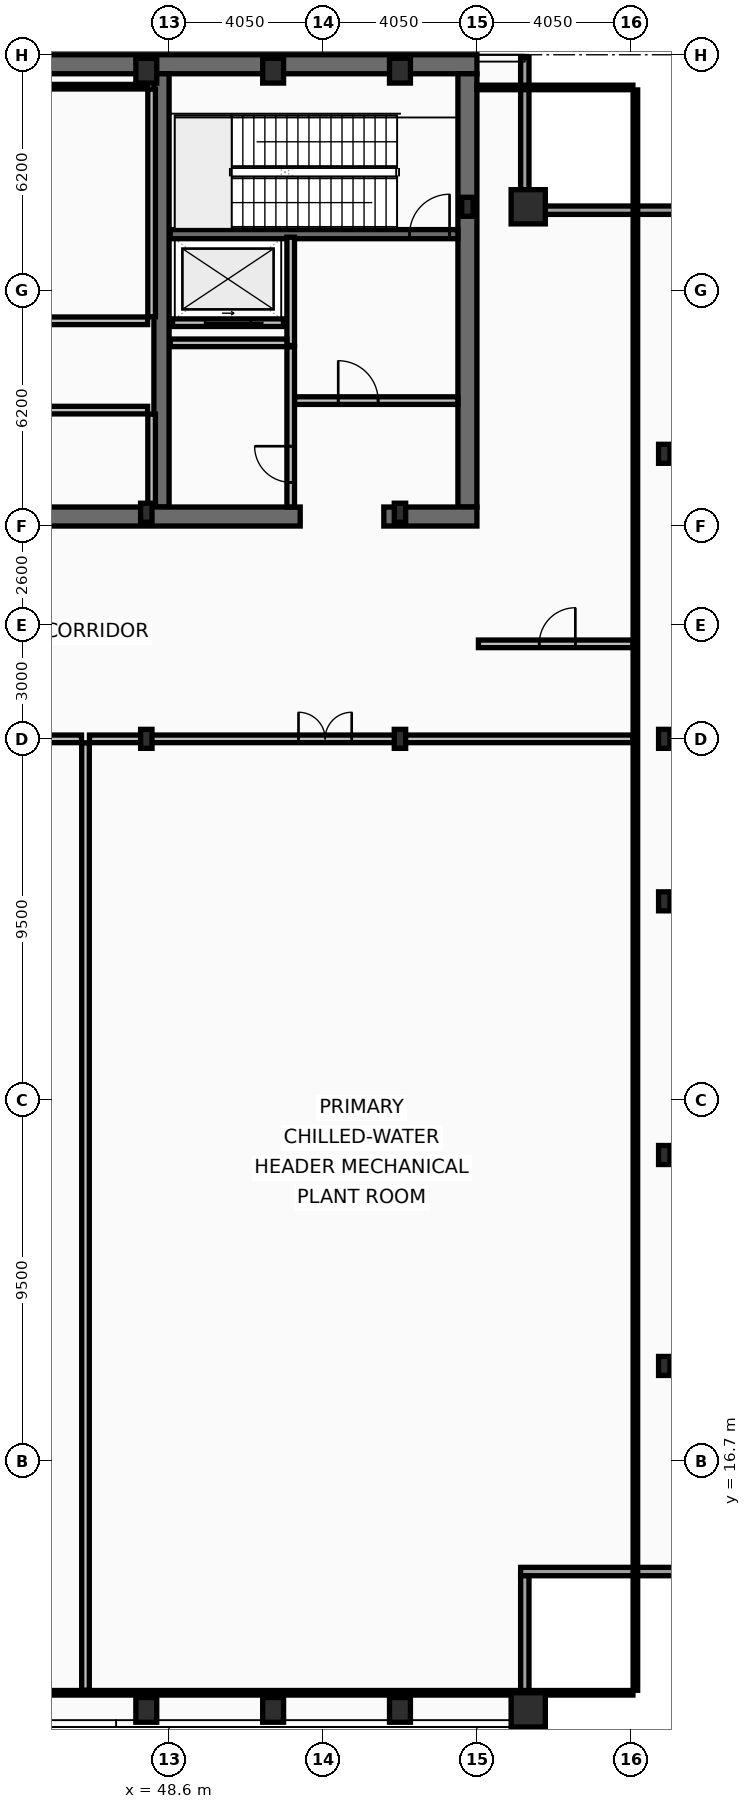
"""IFC4 building model, lengths in metres.
Left out: names, types, materials, properties, quantities, classifications, styles, units other than length and angle.
Written with IfcOpenShell. Run it as: python <this file> out.ifc"""

import sys

from ifc_helpers import new_model, si_unit, direction, frame, frame_2d, origin, origin_2d, place, context, subcontext, project, spatial, rectangle, hollow_rectangle, i_section, extrude, element, fill, save


model = new_model("IFC4")
c1 = context("Model", 3, precision=1e-05, world=origin(), true_north=direction((0.0, 1.0)))
c2 = subcontext(c1, "Body", "Model", "MODEL_VIEW")
j1 = project(units=[si_unit("LENGTHUNIT", "METRE"), si_unit("PLANEANGLEUNIT", "RADIAN")], contexts=[c1])
p1 = place(None, origin())
s1 = spatial("IfcSite", under=j1, at=p1, CompositionType="ELEMENT")
p2 = place(p1, origin())
s2 = spatial("IfcBuilding", under=s1, at=p2, CompositionType="ELEMENT")
p3 = place(p2, frame((0.0, 0.0, 361.8)))
s3 = spatial("IfcBuildingStorey", under=s2, at=p3, CompositionType="ELEMENT", Elevation=361.8)
p4 = place(p3, frame((16.2, 53.45, 0.0), z_axis=(0.0, 0.0, 1.0), x_axis=(1.0, 0.0, 0.0)))
e1 = element("IfcWall", 1, at=p4, inside=s3, PredefinedType="SHEAR", context=c2, shape_type="SweptSolid", body=[
    extrude(rectangle(XDim=40.5, YDim=0.5, at=frame_2d((20.25, 0.0))), origin(), (0.0, 0.0, 1.0), 5.4),
])
p5 = place(p3, frame((56.45, 53.2, 0.0), z_axis=(0.0, 0.0, 1.0), x_axis=(0.0, -1.0, 0.0)))
e2 = element("IfcWall", 2, at=p5, inside=s3, PredefinedType="SHEAR", context=c2, shape_type="SweptSolid", body=[
    extrude(rectangle(XDim=11.4, YDim=0.5, at=frame_2d((5.7, 0.0))), origin(), (0.0, 0.0, 1.0), 5.4),
])
p6 = place(p3, frame((48.4, 41.8, 0.0), z_axis=(0.0, 0.0, 1.0), x_axis=(0.0, 1.0, 0.0)))
e3 = element("IfcWall", 3, at=p6, inside=s3, PredefinedType="SHEAR", context=c2, shape_type="SweptSolid", body=[
    extrude(rectangle(XDim=11.4, YDim=0.4, at=frame_2d((5.7, 0.0))), origin(), (0.0, 0.0, 1.0), 5.4),
])
p7 = place(p3, frame((52.05, 41.55, 0.0), z_axis=(0.0, 0.0, 1.0), x_axis=(-1.0, 0.0, 0.0)))
e4 = element("IfcWall", 4, at=p7, inside=s3, PredefinedType="SHEAR", context=c2, shape_type="SweptSolid", body=[
    extrude(rectangle(XDim=11.3, YDim=0.5, at=frame_2d((5.65, 0.0))), origin(), (0.0, 0.0, 1.0), 5.4),
])
p8 = place(p3, frame((56.7, 41.55, 0.0), z_axis=(0.0, 0.0, 1.0), x_axis=(-1.0, 0.0, 0.0)))
e5 = element("IfcWall", 5, at=p8, inside=s3, PredefinedType="SHEAR", context=c2, shape_type="SweptSolid", body=[
    extrude(rectangle(XDim=2.45, YDim=0.5, at=frame_2d((1.225, 0.0))), origin(), (0.0, 0.0, 1.0), 5.4),
])
p9 = place(p3, frame((48.63, 48.98, 0.0), z_axis=(0.0, 0.0, 1.0), x_axis=(1.0, 0.0, 0.0)))
e6 = element("IfcWall", 6, at=p9, inside=s3, PredefinedType="SHEAR", context=c2, shape_type="SweptSolid", body=[
    extrude(rectangle(XDim=7.57, YDim=0.24, at=frame_2d((3.785, 0.0))), origin(), (0.0, 0.0, 1.0), 5.4),
])
p10 = place(p9, frame((6.3, 0.0, 0.0)))
e7 = element("IfcOpeningElement", 7, at=p10, cuts=e6, PredefinedType="OPENING", context=c2, shape_type="SweptSolid", body=[
    extrude(rectangle(XDim=1.05, YDim=2.15, at=frame_2d((0.525, 1.075))), frame((0.0, 0.13, 0.0), z_axis=(0.0, -1.0, 0.0), x_axis=(1.0, 0.0, 0.0)), (0.0, 0.0, 1.0), 0.26),
])
for number, where, z_axis, x_axis in (
    (8, (58.05, 10.15, 0.0), (0.0, 0.0, 1.0), (1.0, 0.0, 0.0)),
    (9, (58.05, 49.7, 0.0), (0.0, 0.0, 1.0), (1.0, 0.0, 0.0)),
):
    element("IfcColumn", number, at=place(p3, frame(where, z_axis=z_axis, x_axis=x_axis)), inside=s3, PredefinedType="COLUMN", context=c2, shape_type="SweptSolid", body=[
        extrude(hollow_rectangle(XDim=0.9, YDim=0.9, WallThickness=0.05, at=origin_2d()), origin(), (0.0, 0.0, 1.0), 5.6),
    ])
for number, where, z_axis, x_axis in (
    (10, (48.0, 10.15, 0.0), (0.0, 0.0, 1.0), (1.0, 0.0, 0.0)),
    (11, (51.337, 10.15, 0.0), (0.0, 0.0, 1.0), (1.0, 0.0, 0.0)),
    (12, (54.675, 10.15, 0.0), (0.0, 0.0, 1.0), (1.0, 0.0, 0.0)),
    (13, (48.0, 53.28, 0.0), (0.0, 0.0, 1.0), (1.0, 0.0, 0.0)),
    (14, (51.337, 53.28, 0.0), (0.0, 0.0, 1.0), (1.0, 0.0, 0.0)),
    (15, (54.675, 53.28, 0.0), (0.0, 0.0, 1.0), (1.0, 0.0, 0.0)),
):
    element("IfcColumn", number, at=place(p3, frame(where, z_axis=z_axis, x_axis=x_axis)), inside=s3, PredefinedType="COLUMN", context=c2, shape_type="SweptSolid", body=[
        extrude(hollow_rectangle(XDim=0.55, YDim=0.65, WallThickness=0.04, at=origin_2d()), origin(), (0.0, 0.0, 1.0), 5.6),
    ])
for number, where, z_axis, x_axis in (
    (16, (61.63, 19.2, 0.0), (0.0, 0.0, 1.0), (1.0, 0.0, 0.0)),
    (17, (61.63, 24.75, 0.0), (0.0, 0.0, 1.0), (1.0, 0.0, 0.0)),
    (18, (61.63, 31.425, 0.0), (0.0, 0.0, 1.0), (1.0, 0.0, 0.0)),
    (19, (61.63, 35.7, 0.0), (0.0, 0.0, 1.0), (1.0, 0.0, 0.0)),
    (20, (61.63, 43.2, 0.0), (0.0, 0.0, 1.0), (1.0, 0.0, 0.0)),
    (21, (56.45, 49.7, 0.0), (0.0, 0.0, 1.0), (1.0, 0.0, 0.0)),
    (22, (48.0, 35.7, 0.0), (0.0, 0.0, 1.0), (1.0, 0.0, 0.0)),
    (23, (48.0, 41.65, 0.0), (0.0, 0.0, 1.0), (1.0, 0.0, 0.0)),
    (24, (54.675, 35.7, 0.0), (0.0, 0.0, 1.0), (1.0, 0.0, 0.0)),
    (25, (54.675, 41.65, 0.0), (0.0, 0.0, 1.0), (1.0, 0.0, 0.0)),
):
    element("IfcColumn", number, at=place(p3, frame(where, z_axis=z_axis, x_axis=x_axis)), inside=s3, PredefinedType="COLUMN", context=c2, shape_type="SweptSolid", body=[
        extrude(i_section(OverallWidth=0.3, OverallDepth=0.5, WebThickness=0.014, FlangeThickness=0.028, at=origin_2d()), origin(), (0.0, 0.0, 1.0), 5.6),
    ])
p11 = place(p3, frame((57.96, 53.63, 0.0), z_axis=(0.0, 0.0, 1.0), x_axis=(0.0, -1.0, 0.0)))
e26 = element("IfcWall", 26, at=p11, inside=s3, PredefinedType="SOLIDWALL", context=c2, shape_type="SweptSolid", body=[
    extrude(rectangle(XDim=3.91, YDim=0.22, at=frame_2d((1.955, 0.0))), origin(), (0.0, 0.0, 1.0), 4.84),
])
for number, where, z_axis, x_axis in (
    (27, (57.85, 49.61, 0.0), (0.0, 0.0, 1.0), (1.0, 0.0, 0.0)),
    (28, (61.98, 13.79, 0.0), (0.0, 0.0, 1.0), (-1.0, 0.0, 0.0)),
):
    element("IfcWall", number, at=place(p3, frame(where, z_axis=z_axis, x_axis=x_axis)), inside=s3, PredefinedType="SOLIDWALL", context=c2, shape_type="SweptSolid", body=[
        extrude(rectangle(XDim=4.13, YDim=0.22, at=frame_2d((2.065, 0.0))), origin(), (0.0, 0.0, 1.0), 4.84),
    ])
p12 = place(p3, frame((57.96, 13.68, 0.0), z_axis=(0.0, 0.0, 1.0), x_axis=(0.0, -1.0, 0.0)))
e29 = element("IfcWall", 29, at=p12, inside=s3, PredefinedType="SOLIDWALL", context=c2, shape_type="SweptSolid", body=[
    extrude(rectangle(XDim=3.91, YDim=0.22, at=frame_2d((1.955, 0.0))), origin(), (0.0, 0.0, 1.0), 4.84),
])
p13 = place(p3, frame((51.61, 46.65, 0.0), z_axis=(0.0, 0.0, 1.0), x_axis=(-1.0, 0.0, 0.0)))
e30 = element("IfcWall", 30, at=p13, inside=s3, PredefinedType="PARTITIONING", context=c2, shape_type="SweptSolid", body=[
    extrude(rectangle(XDim=2.92, YDim=0.2, at=frame_2d((1.46, 0.0))), origin(), (0.0, 0.0, 1.0), 5.4),
])
p14 = place(p13, frame((0.86, 0.0, 0.0)))
e31 = element("IfcOpeningElement", 31, at=p14, cuts=e30, PredefinedType="OPENING", context=c2, shape_type="SweptSolid", body=[
    extrude(rectangle(XDim=1.2, YDim=2.18, at=frame_2d((0.6, 1.09))), frame((0.0, 0.11, 0.0), z_axis=(0.0, -1.0, 0.0), x_axis=(1.0, 0.0, 0.0)), (0.0, 0.0, 1.0), 0.22),
])
p15 = place(p3, frame((51.8, 46.05, 0.0), z_axis=(0.0, 0.0, 1.0), x_axis=(0.0, 1.0, 0.0)))
e32 = element("IfcWall", 32, at=p15, inside=s3, PredefinedType="PARTITIONING", context=c2, shape_type="SweptSolid", body=[
    extrude(rectangle(XDim=2.85, YDim=0.2, at=frame_2d((1.425, 0.0))), origin(), (0.0, 0.0, 1.0), 5.4),
])
p16 = place(p3, frame((51.9, 44.6, 0.0), z_axis=(0.0, 0.0, 1.0), x_axis=(1.0, 0.0, 0.0)))
e33 = element("IfcWall", 33, at=p16, inside=s3, PredefinedType="PARTITIONING", context=c2, shape_type="SweptSolid", body=[
    extrude(rectangle(XDim=4.3, YDim=0.2, at=frame_2d((2.15, 0.0))), origin(), (0.0, 0.0, 1.0), 5.4),
])
p17 = place(p16, frame((1.15, 0.0, 0.0)))
e34 = element("IfcOpeningElement", 34, at=p17, cuts=e33, PredefinedType="OPENING", context=c2, shape_type="SweptSolid", body=[
    extrude(rectangle(XDim=1.05, YDim=2.15, at=frame_2d((0.525, 1.075))), frame((0.0, 0.11, 0.0), z_axis=(0.0, -1.0, 0.0), x_axis=(1.0, 0.0, 0.0)), (0.0, 0.0, 1.0), 0.22),
])
p18 = place(p3, frame((48.63, 46.12, 0.0), z_axis=(0.0, 0.0, 1.0), x_axis=(1.0, 0.0, 0.0)))
e35 = element("IfcWall", 35, at=p18, inside=s3, PredefinedType="PARTITIONING", context=c2, shape_type="SweptSolid", body=[
    extrude(rectangle(XDim=3.07, YDim=0.2, at=frame_2d((1.535, 0.0))), origin(), (0.0, 0.0, 1.0), 5.4),
])
p19 = place(p3, frame((51.8, 41.8, 0.0), z_axis=(0.0, 0.0, 1.0), x_axis=(0.0, 1.0, 0.0)))
e36 = element("IfcWall", 36, at=p19, inside=s3, PredefinedType="PARTITIONING", context=c2, shape_type="SweptSolid", body=[
    extrude(rectangle(XDim=4.215, YDim=0.2, at=frame_2d((2.107, 0.0))), origin(), (0.0, 0.0, 1.0), 5.4),
])
p20 = place(p19, frame((0.65, 0.0, 0.0)))
e37 = element("IfcOpeningElement", 37, at=p20, cuts=e36, PredefinedType="OPENING", context=c2, shape_type="SweptSolid", body=[
    extrude(rectangle(XDim=0.95, YDim=2.1, at=frame_2d((0.475, 1.05))), frame((0.0, 0.11, 0.0), z_axis=(0.0, -1.0, 0.0), x_axis=(1.0, 0.0, 0.0)), (0.0, 0.0, 1.0), 0.22),
])
p21 = place(p3, frame((48.14, 46.805, 0.0), z_axis=(0.0, 0.0, 1.0), x_axis=(0.0, 1.0, 0.0)))
e38 = element("IfcWall", 38, at=p21, inside=s3, PredefinedType="PARTITIONING", context=c2, shape_type="SweptSolid", body=[
    extrude(rectangle(XDim=5.99, YDim=0.2, at=frame_2d((2.995, 0.0))), origin(), (0.0, 0.0, 1.0), 5.4),
])
p22 = place(p3, frame((40.685, 52.86, 0.0), z_axis=(0.0, 0.0, 1.0), x_axis=(1.0, 0.0, 0.0)))
e39 = element("IfcWall", 39, at=p22, inside=s3, PredefinedType="PARTITIONING", context=c2, shape_type="SweptSolid", body=[
    extrude(rectangle(XDim=7.35, YDim=0.12, at=frame_2d((3.675, 0.0))), origin(), (0.0, 0.0, 1.0), 5.4),
])
p23 = place(p3, frame((40.685, 46.7, 0.0), z_axis=(0.0, 0.0, 1.0), x_axis=(1.0, 0.0, 0.0)))
e40 = element("IfcWall", 40, at=p23, inside=s3, PredefinedType="PARTITIONING", context=c2, shape_type="SweptSolid", body=[
    extrude(rectangle(XDim=7.35, YDim=0.2, at=frame_2d((3.675, 0.0))), origin(), (0.0, 0.0, 1.0), 5.4),
])
p24 = place(p23, frame((0.55, 0.0, 0.0)))
e41 = element("IfcOpeningElement", 41, at=p24, cuts=e40, PredefinedType="OPENING", context=c2, shape_type="SweptSolid", body=[
    extrude(rectangle(XDim=0.95, YDim=2.1, at=frame_2d((0.475, 1.05))), frame((0.0, 0.11, 0.0), z_axis=(0.0, -1.0, 0.0), x_axis=(1.0, 0.0, 0.0)), (0.0, 0.0, 1.0), 0.22),
])
p25 = place(p23, frame((3.723, 0.0, 0.0)))
e42 = element("IfcOpeningElement", 42, at=p25, cuts=e40, PredefinedType="OPENING", context=c2, shape_type="SweptSolid", body=[
    extrude(rectangle(XDim=0.95, YDim=2.1, at=frame_2d((0.475, 1.05))), frame((0.0, 0.11, 0.0), z_axis=(0.0, -1.0, 0.0), x_axis=(1.0, 0.0, 0.0)), (0.0, 0.0, 1.0), 0.22),
])
p26 = place(p3, frame((48.14, 41.85, 0.0), z_axis=(0.0, 0.0, 1.0), x_axis=(0.0, 1.0, 0.0)))
e43 = element("IfcWall", 43, at=p26, inside=s3, PredefinedType="PARTITIONING", context=c2, shape_type="SweptSolid", body=[
    extrude(rectangle(XDim=2.395, YDim=0.2, at=frame_2d((1.198, 0.0))), origin(), (0.0, 0.0, 1.0), 5.4),
])
p27 = place(p3, frame((40.755, 44.35, 0.0), z_axis=(0.0, 0.0, 1.0), x_axis=(1.0, 0.0, 0.0)))
e44 = element("IfcWall", 44, at=p27, inside=s3, PredefinedType="PARTITIONING", context=c2, shape_type="SweptSolid", body=[
    extrude(rectangle(XDim=7.28, YDim=0.2, at=frame_2d((3.64, 0.0))), origin(), (0.0, 0.0, 1.0), 5.4),
])
p28 = place(p27, frame((0.55, 0.0, 0.0)))
e45 = element("IfcOpeningElement", 45, at=p28, cuts=e44, PredefinedType="OPENING", context=c2, shape_type="SweptSolid", body=[
    extrude(rectangle(XDim=0.95, YDim=2.1, at=frame_2d((0.475, 1.05))), frame((0.0, 0.11, 0.0), z_axis=(0.0, -1.0, 0.0), x_axis=(1.0, 0.0, 0.0)), (0.0, 0.0, 1.0), 0.22),
])
p29 = place(p27, frame((3.696, 0.0, 0.0)))
e46 = element("IfcOpeningElement", 46, at=p29, cuts=e44, PredefinedType="OPENING", context=c2, shape_type="SweptSolid", body=[
    extrude(rectangle(XDim=0.95, YDim=2.1, at=frame_2d((0.475, 1.05))), frame((0.0, 0.11, 0.0), z_axis=(0.0, -1.0, 0.0), x_axis=(1.0, 0.0, 0.0)), (0.0, 0.0, 1.0), 0.22),
])
p30 = place(p3, frame((26.605, 35.7, 0.0), z_axis=(0.0, 0.0, 1.0), x_axis=(1.0, 0.0, 0.0)))
e47 = element("IfcWall", 47, at=p30, inside=s3, PredefinedType="PARTITIONING", context=c2, shape_type="SweptSolid", body=[
    extrude(rectangle(XDim=19.69, YDim=0.2, at=frame_2d((9.845, 0.0))), origin(), (0.0, 0.0, 1.0), 5.03),
])
p31 = place(p30, frame((8.5, 0.0, 0.0)))
e48 = element("IfcOpeningElement", 48, at=p31, cuts=e47, PredefinedType="OPENING", context=c2, shape_type="SweptSolid", body=[
    extrude(rectangle(XDim=1.4, YDim=2.15, at=frame_2d((0.7, 1.075))), frame((0.0, 0.11, 0.0), z_axis=(0.0, -1.0, 0.0), x_axis=(1.0, 0.0, 0.0)), (0.0, 0.0, 1.0), 0.22),
])
p32 = place(p3, frame((46.505, 35.7, 0.0), z_axis=(0.0, 0.0, 1.0), x_axis=(1.0, 0.0, 0.0)))
e49 = element("IfcWall", 49, at=p32, inside=s3, PredefinedType="PARTITIONING", context=c2, shape_type="SweptSolid", body=[
    extrude(rectangle(XDim=14.3, YDim=0.2, at=frame_2d((7.15, 0.0))), origin(), (0.0, 0.0, 1.0), 4.79),
])
p33 = place(p32, frame((5.5, 0.0, 0.0)))
e50 = element("IfcOpeningElement", 50, at=p33, cuts=e49, PredefinedType="OPENING", context=c2, shape_type="SweptSolid", body=[
    extrude(rectangle(XDim=1.4, YDim=2.15, at=frame_2d((0.7, 1.075))), frame((0.0, 0.11, 0.0), z_axis=(0.0, -1.0, 0.0), x_axis=(1.0, 0.0, 0.0)), (0.0, 0.0, 1.0), 0.22),
])
p34 = place(p3, frame((46.4, 10.665, 0.0), z_axis=(0.0, 0.0, 1.0), x_axis=(0.0, 1.0, 0.0)))
e51 = element("IfcWall", 51, at=p34, inside=s3, PredefinedType="PARTITIONING", context=c2, shape_type="SweptSolid", body=[
    extrude(rectangle(XDim=24.93, YDim=0.2, at=frame_2d((12.465, 0.0))), origin(), (0.0, 0.0, 1.0), 5.03),
])
p35 = place(p3, frame((56.74, 38.2, 0.0), z_axis=(0.0, 0.0, 1.0), x_axis=(1.0, 0.0, 0.0)))
e52 = element("IfcWall", 52, at=p35, inside=s3, PredefinedType="PARTITIONING", context=c2, shape_type="SweptSolid", body=[
    extrude(rectangle(XDim=4.065, YDim=0.2, at=frame_2d((2.032, 0.0))), origin(), (0.0, 0.0, 1.0), 5.4),
])
p36 = place(p35, frame((1.6, 0.0, 0.0)))
e53 = element("IfcOpeningElement", 53, at=p36, cuts=e52, PredefinedType="OPENING", context=c2, shape_type="SweptSolid", body=[
    extrude(rectangle(XDim=0.95, YDim=2.1, at=frame_2d((0.475, 1.05))), frame((0.0, 0.11, 0.0), z_axis=(0.0, -1.0, 0.0), x_axis=(1.0, 0.0, 0.0)), (0.0, 0.0, 1.0), 0.22),
])
p37 = place(p3, frame((60.87, 10.665, 0.0), z_axis=(0.0, 0.0, 1.0), x_axis=(0.0, 1.0, 0.0)))
e54 = element("IfcWall", 54, at=p37, inside=s3, PredefinedType="PARTITIONING", context=c2, shape_type="SweptSolid", body=[
    extrude(rectangle(XDim=42.11, YDim=0.12, at=frame_2d((21.055, 0.0))), origin(), (0.0, 0.0, 1.0), 4.79),
])
p38 = place(p3, frame((56.7, 52.84, 0.0), z_axis=(0.0, 0.0, 1.0), x_axis=(1.0, 0.0, 0.0)))
e55 = element("IfcWall", 55, at=p38, inside=s3, PredefinedType="PARTITIONING", context=c2, shape_type="SweptSolid", body=[
    extrude(rectangle(XDim=4.105, YDim=0.12, at=frame_2d((2.052, 0.0))), origin(), (0.0, 0.0, 1.0), 5.4),
])
p39 = place(p3, frame((12.095, 10.6, 0.0), z_axis=(0.0, 0.0, 1.0), x_axis=(1.0, 0.0, 0.0)))
e56 = element("IfcWall", 56, at=p39, inside=s3, PredefinedType="PARTITIONING", context=c2, shape_type="SweptSolid", body=[
    extrude(rectangle(XDim=48.71, YDim=0.12, at=frame_2d((24.355, 0.0))), origin(), (0.0, 0.0, 1.0), 4.79),
])
p40 = place(p10, origin())
e57 = element("IfcDoor", 57, at=p40, inside=s3, OperationType="SINGLE_SWING_RIGHT", PredefinedType="DOOR", context=c2, shape_type="SweptSolid", body=[
    extrude(rectangle(XDim=1.05, YDim=2.15, at=frame_2d((0.525, 1.075))), frame((0.0, 0.025, 0.0), z_axis=(0.0, -1.0, 0.0), x_axis=(1.0, 0.0, 0.0)), (0.0, 0.0, 1.0), 0.05),
])
fill(e7, e57)
p41 = place(p14, origin())
e58 = element("IfcDoor", 58, at=p41, inside=s3, OperationType="SLIDING_TO_LEFT", PredefinedType="DOOR", context=c2, shape_type="SweptSolid", body=[
    extrude(rectangle(XDim=1.2, YDim=2.18, at=frame_2d((0.6, 1.09))), frame((0.0, 0.025, 0.0), z_axis=(0.0, -1.0, 0.0), x_axis=(1.0, 0.0, 0.0)), (0.0, 0.0, 1.0), 0.05),
])
fill(e31, e58)
p42 = place(p17, origin())
e59 = element("IfcDoor", 59, at=p42, inside=s3, OperationType="SINGLE_SWING_LEFT", PredefinedType="DOOR", context=c2, shape_type="SweptSolid", body=[
    extrude(rectangle(XDim=1.05, YDim=2.15, at=frame_2d((0.525, 1.075))), frame((0.0, 0.025, 0.0), z_axis=(0.0, -1.0, 0.0), x_axis=(1.0, 0.0, 0.0)), (0.0, 0.0, 1.0), 0.05),
])
fill(e34, e59)
p43 = place(p20, origin())
e60 = element("IfcDoor", 60, at=p43, inside=s3, OperationType="SINGLE_SWING_RIGHT", PredefinedType="DOOR", context=c2, shape_type="SweptSolid", body=[
    extrude(rectangle(XDim=0.95, YDim=2.1, at=frame_2d((0.475, 1.05))), frame((0.0, 0.025, 0.0), z_axis=(0.0, -1.0, 0.0), x_axis=(1.0, 0.0, 0.0)), (0.0, 0.0, 1.0), 0.05),
])
fill(e37, e60)
p44 = place(p33, origin())
e61 = element("IfcDoor", 61, at=p44, inside=s3, OperationType="DOUBLE_DOOR_SINGLE_SWING", PredefinedType="DOOR", context=c2, shape_type="SweptSolid", body=[
    extrude(rectangle(XDim=1.4, YDim=2.15, at=frame_2d((0.7, 1.075))), frame((0.0, 0.025, 0.0), z_axis=(0.0, -1.0, 0.0), x_axis=(1.0, 0.0, 0.0)), (0.0, 0.0, 1.0), 0.05),
])
fill(e50, e61)
p45 = place(p36, origin())
e62 = element("IfcDoor", 62, at=p45, inside=s3, OperationType="SINGLE_SWING_RIGHT", PredefinedType="DOOR", context=c2, shape_type="SweptSolid", body=[
    extrude(rectangle(XDim=0.95, YDim=2.1, at=frame_2d((0.475, 1.05))), frame((0.0, 0.025, 0.0), z_axis=(0.0, -1.0, 0.0), x_axis=(1.0, 0.0, 0.0)), (0.0, 0.0, 1.0), 0.05),
])
fill(e53, e62)
save(model, sys.argv[1])
